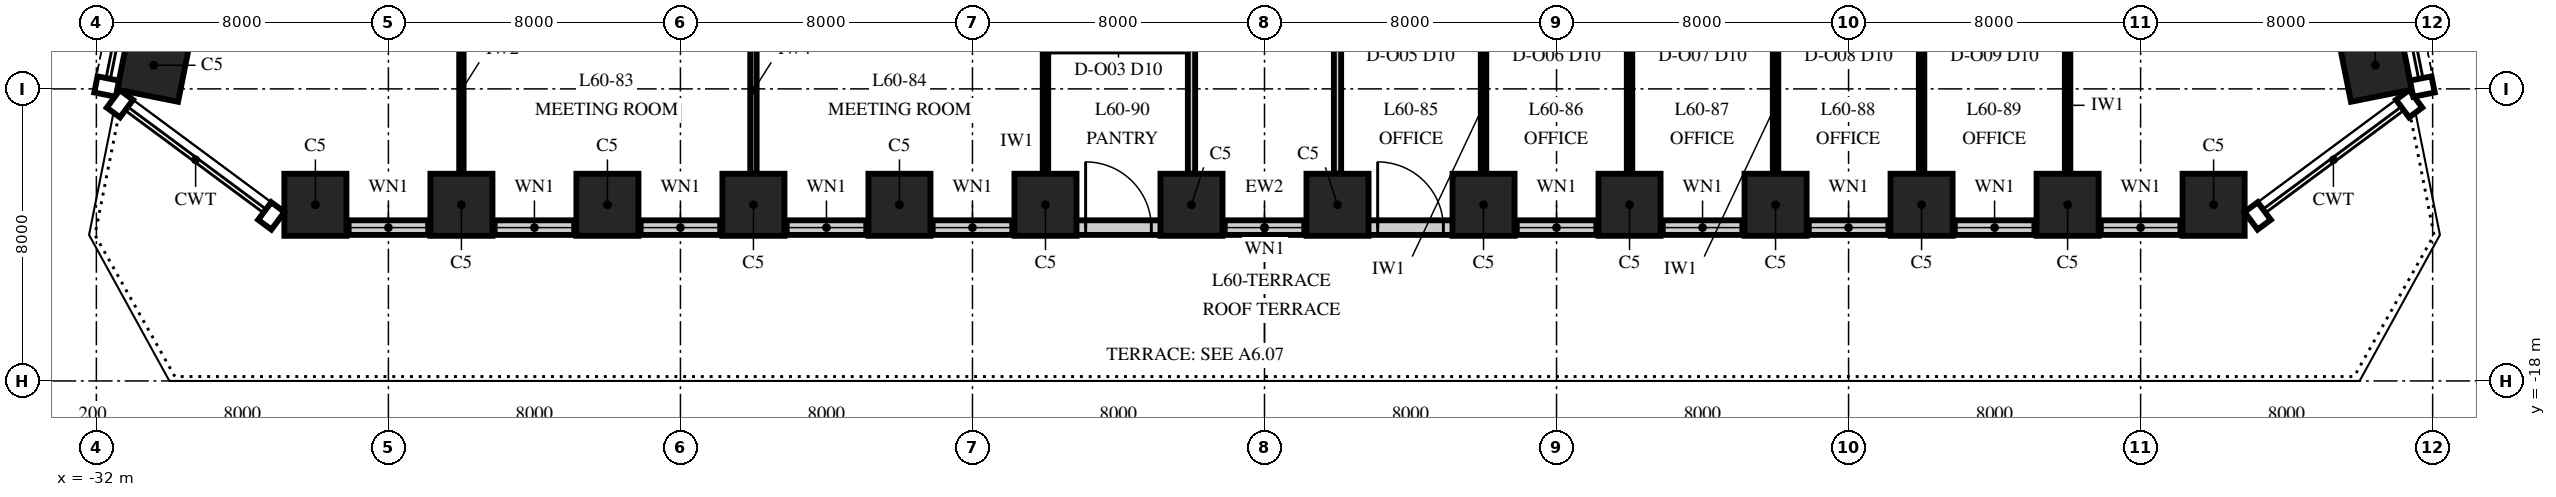
"""IFC4 building model, lengths in metres.
Left out: names, types, materials, properties, quantities, classifications, styles, units other than length and angle.
Written with IfcOpenShell. Run it as: python <this file> out.ifc"""

import sys

from ifc_helpers import new_model, si_unit, direction, frame, frame_2d, origin, origin_2d, place, context, subcontext, project, spatial, rectangle, extrude, element, fill, save


model = new_model("IFC4")
c1 = context("Model", 3, precision=1e-05, world=origin(), true_north=direction((0.0, 1.0)))
c2 = subcontext(c1, "Body", "Model", "MODEL_VIEW")
j1 = project(units=[si_unit("LENGTHUNIT", "METRE"), si_unit("PLANEANGLEUNIT", "RADIAN")], contexts=[c1])
p1 = place(None, origin())
s1 = spatial("IfcSite", under=j1, at=p1, CompositionType="ELEMENT")
p2 = place(p1, origin())
s2 = spatial("IfcBuilding", under=s1, at=p2, CompositionType="ELEMENT")
p3 = place(p2, frame((0.0, 0.0, 260.0)))
s3 = spatial("IfcBuildingStorey", under=s2, at=p3, CompositionType="ELEMENT", Elevation=260.0)
for number, where, z_axis, x_axis in (
    (1, (-26.0, -13.175, -0.25), (0.0, 0.0, 1.0), (1.0, 0.0, 0.0)),
    (2, (-22.0, -13.175, -0.25), (0.0, 0.0, 1.0), (1.0, 0.0, 0.0)),
    (3, (-18.0, -13.175, -0.25), (0.0, 0.0, 1.0), (1.0, 0.0, 0.0)),
    (4, (-14.0, -13.175, -0.25), (0.0, 0.0, 1.0), (1.0, 0.0, 0.0)),
    (5, (-10.0, -13.175, -0.25), (0.0, 0.0, 1.0), (1.0, 0.0, 0.0)),
    (6, (-6.0, -13.175, -0.25), (0.0, 0.0, 1.0), (1.0, 0.0, 0.0)),
    (7, (-2.0, -13.175, -0.25), (0.0, 0.0, 1.0), (1.0, 0.0, 0.0)),
    (8, (2.0, -13.175, -0.25), (0.0, 0.0, 1.0), (1.0, 0.0, 0.0)),
    (9, (6.0, -13.175, -0.25), (0.0, 0.0, 1.0), (1.0, 0.0, 0.0)),
    (10, (10.0, -13.175, -0.25), (0.0, 0.0, 1.0), (1.0, 0.0, 0.0)),
    (11, (14.0, -13.175, -0.25), (0.0, 0.0, 1.0), (1.0, 0.0, 0.0)),
    (12, (18.0, -13.175, -0.25), (0.0, 0.0, 1.0), (1.0, 0.0, 0.0)),
    (13, (22.0, -13.175, -0.25), (0.0, 0.0, 1.0), (1.0, 0.0, 0.0)),
    (14, (26.0, -13.175, -0.25), (0.0, 0.0, 1.0), (1.0, 0.0, 0.0)),
):
    element("IfcColumn", number, at=place(p3, frame(where, z_axis=z_axis, x_axis=x_axis)), inside=s3, PredefinedType="COLUMN", context=c2, shape_type="SweptSolid", body=[
        extrude(rectangle(XDim=1.7, YDim=1.7, at=origin_2d()), origin(), (0.0, 0.0, 1.0), 4.25),
    ])
for number, where, z_axis, x_axis in (
    (15, (30.429, -9.353, 0.0), (0.0, 0.0, 1.0), (-0.196, 0.981, 0.0)),
    (16, (-30.429, -9.353, 0.0), (0.0, 0.0, 1.0), (-0.196, -0.981, 0.0)),
):
    element("IfcColumn", number, at=place(p3, frame(where, z_axis=z_axis, x_axis=x_axis)), inside=s3, PredefinedType="COLUMN", context=c2, shape_type="SweptSolid", body=[
        extrude(rectangle(XDim=1.7, YDim=1.7, at=origin_2d()), origin(), (0.0, 0.0, 1.0), 4.0),
    ])
p4 = place(p3, frame((-26.0, -13.8, 0.0), z_axis=(0.0, 0.0, 1.0), x_axis=(1.0, 0.0, 0.0)))
e17 = element("IfcWall", 17, at=p4, inside=s3, PredefinedType="SOLIDWALL", context=c2, shape_type="SweptSolid", body=[
    extrude(rectangle(XDim=52.0, YDim=0.4, at=frame_2d((26.0, 0.0))), origin(), (0.0, 0.0, 1.0), 2.0),
])
p5 = place(p4, frame((0.95, 0.0, 0.8)))
e18 = element("IfcOpeningElement", 18, at=p5, cuts=e17, PredefinedType="OPENING", context=c2, shape_type="SweptSolid", body=[
    extrude(rectangle(XDim=2.1, YDim=1.15, at=frame_2d((1.05, 0.575))), frame((0.0, 0.215, 0.0), z_axis=(0.0, -1.0, 0.0), x_axis=(1.0, 0.0, 0.0)), (0.0, 0.0, 1.0), 0.43),
])
p6 = place(p4, frame((4.95, 0.0, 0.8)))
e19 = element("IfcOpeningElement", 19, at=p6, cuts=e17, PredefinedType="OPENING", context=c2, shape_type="SweptSolid", body=[
    extrude(rectangle(XDim=2.1, YDim=1.15, at=frame_2d((1.05, 0.575))), frame((0.0, 0.215, 0.0), z_axis=(0.0, -1.0, 0.0), x_axis=(1.0, 0.0, 0.0)), (0.0, 0.0, 1.0), 0.43),
])
p7 = place(p4, frame((8.95, 0.0, 0.8)))
e20 = element("IfcOpeningElement", 20, at=p7, cuts=e17, PredefinedType="OPENING", context=c2, shape_type="SweptSolid", body=[
    extrude(rectangle(XDim=2.1, YDim=1.15, at=frame_2d((1.05, 0.575))), frame((0.0, 0.215, 0.0), z_axis=(0.0, -1.0, 0.0), x_axis=(1.0, 0.0, 0.0)), (0.0, 0.0, 1.0), 0.43),
])
p8 = place(p4, frame((12.95, 0.0, 0.8)))
e21 = element("IfcOpeningElement", 21, at=p8, cuts=e17, PredefinedType="OPENING", context=c2, shape_type="SweptSolid", body=[
    extrude(rectangle(XDim=2.1, YDim=1.15, at=frame_2d((1.05, 0.575))), frame((0.0, 0.215, 0.0), z_axis=(0.0, -1.0, 0.0), x_axis=(1.0, 0.0, 0.0)), (0.0, 0.0, 1.0), 0.43),
])
p9 = place(p4, frame((16.95, 0.0, 0.8)))
e22 = element("IfcOpeningElement", 22, at=p9, cuts=e17, PredefinedType="OPENING", context=c2, shape_type="SweptSolid", body=[
    extrude(rectangle(XDim=2.1, YDim=1.15, at=frame_2d((1.05, 0.575))), frame((0.0, 0.215, 0.0), z_axis=(0.0, -1.0, 0.0), x_axis=(1.0, 0.0, 0.0)), (0.0, 0.0, 1.0), 0.43),
])
p10 = place(p4, frame((21.1, 0.0, 0.0)))
e23 = element("IfcOpeningElement", 23, at=p10, cuts=e17, PredefinedType="OPENING", context=c2, shape_type="SweptSolid", body=[
    extrude(rectangle(XDim=1.8, YDim=2.0, at=frame_2d((0.9, 1.0))), frame((0.0, 0.215, 0.0), z_axis=(0.0, -1.0, 0.0), x_axis=(1.0, 0.0, 0.0)), (0.0, 0.0, 1.0), 0.43),
])
p11 = place(p4, frame((24.95, 0.0, 0.8)))
e24 = element("IfcOpeningElement", 24, at=p11, cuts=e17, PredefinedType="OPENING", context=c2, shape_type="SweptSolid", body=[
    extrude(rectangle(XDim=2.1, YDim=1.15, at=frame_2d((1.05, 0.575))), frame((0.0, 0.215, 0.0), z_axis=(0.0, -1.0, 0.0), x_axis=(1.0, 0.0, 0.0)), (0.0, 0.0, 1.0), 0.43),
])
p12 = place(p4, frame((29.1, 0.0, 0.0)))
e25 = element("IfcOpeningElement", 25, at=p12, cuts=e17, PredefinedType="OPENING", context=c2, shape_type="SweptSolid", body=[
    extrude(rectangle(XDim=1.8, YDim=2.0, at=frame_2d((0.9, 1.0))), frame((0.0, 0.215, 0.0), z_axis=(0.0, -1.0, 0.0), x_axis=(1.0, 0.0, 0.0)), (0.0, 0.0, 1.0), 0.43),
])
p13 = place(p4, frame((32.95, 0.0, 0.8)))
e26 = element("IfcOpeningElement", 26, at=p13, cuts=e17, PredefinedType="OPENING", context=c2, shape_type="SweptSolid", body=[
    extrude(rectangle(XDim=2.1, YDim=1.15, at=frame_2d((1.05, 0.575))), frame((0.0, 0.215, 0.0), z_axis=(0.0, -1.0, 0.0), x_axis=(1.0, 0.0, 0.0)), (0.0, 0.0, 1.0), 0.43),
])
p14 = place(p4, frame((36.95, 0.0, 0.8)))
e27 = element("IfcOpeningElement", 27, at=p14, cuts=e17, PredefinedType="OPENING", context=c2, shape_type="SweptSolid", body=[
    extrude(rectangle(XDim=2.1, YDim=1.15, at=frame_2d((1.05, 0.575))), frame((0.0, 0.215, 0.0), z_axis=(0.0, -1.0, 0.0), x_axis=(1.0, 0.0, 0.0)), (0.0, 0.0, 1.0), 0.43),
])
p15 = place(p4, frame((40.95, 0.0, 0.8)))
e28 = element("IfcOpeningElement", 28, at=p15, cuts=e17, PredefinedType="OPENING", context=c2, shape_type="SweptSolid", body=[
    extrude(rectangle(XDim=2.1, YDim=1.15, at=frame_2d((1.05, 0.575))), frame((0.0, 0.215, 0.0), z_axis=(0.0, -1.0, 0.0), x_axis=(1.0, 0.0, 0.0)), (0.0, 0.0, 1.0), 0.43),
])
p16 = place(p4, frame((44.95, 0.0, 0.8)))
e29 = element("IfcOpeningElement", 29, at=p16, cuts=e17, PredefinedType="OPENING", context=c2, shape_type="SweptSolid", body=[
    extrude(rectangle(XDim=2.1, YDim=1.15, at=frame_2d((1.05, 0.575))), frame((0.0, 0.215, 0.0), z_axis=(0.0, -1.0, 0.0), x_axis=(1.0, 0.0, 0.0)), (0.0, 0.0, 1.0), 0.43),
])
p17 = place(p4, frame((48.95, 0.0, 0.8)))
e30 = element("IfcOpeningElement", 30, at=p17, cuts=e17, PredefinedType="OPENING", context=c2, shape_type="SweptSolid", body=[
    extrude(rectangle(XDim=2.1, YDim=1.15, at=frame_2d((1.05, 0.575))), frame((0.0, 0.215, 0.0), z_axis=(0.0, -1.0, 0.0), x_axis=(1.0, 0.0, 0.0)), (0.0, 0.0, 1.0), 0.43),
])
p18 = place(p3, frame((-22.0, -12.325, 0.0), z_axis=(0.0, 0.0, 1.0), x_axis=(0.0, 1.0, 0.0)))
e31 = element("IfcWall", 31, at=p18, inside=s3, PredefinedType="PARTITIONING", context=c2, shape_type="SweptSolid", body=[
    extrude(rectangle(XDim=4.565, YDim=0.12, at=frame_2d((2.282, 0.0))), origin(), (0.0, 0.0, 1.0), 3.23),
])
p19 = place(p3, frame((-14.0, -12.325, 0.0), z_axis=(0.0, 0.0, 1.0), x_axis=(0.0, 1.0, 0.0)))
e32 = element("IfcWall", 32, at=p19, inside=s3, PredefinedType="PARTITIONING", context=c2, shape_type="SweptSolid", body=[
    extrude(rectangle(XDim=4.565, YDim=0.175, at=frame_2d((2.282, 0.0))), origin(), (0.0, 0.0, 1.0), 3.23),
])
p20 = place(p3, frame((-6.0, -12.325, 0.0), z_axis=(0.0, 0.0, 1.0), x_axis=(0.0, 1.0, 0.0)))
e33 = element("IfcWall", 33, at=p20, inside=s3, PredefinedType="PARTITIONING", context=c2, shape_type="SweptSolid", body=[
    extrude(rectangle(XDim=3.35, YDim=0.15, at=frame_2d((1.675, 0.0))), origin(), (0.0, 0.0, 1.0), 3.23),
])
for number, where, z_axis, x_axis in (
    (34, (-2.0, -12.325, 0.0), (0.0, 0.0, 1.0), (0.0, 1.0, 0.0)),
    (35, (2.0, -12.325, 0.0), (0.0, 0.0, 1.0), (0.0, 1.0, 0.0)),
):
    element("IfcWall", number, at=place(p3, frame(where, z_axis=z_axis, x_axis=x_axis)), inside=s3, PredefinedType="PARTITIONING", context=c2, shape_type="SweptSolid", body=[
        extrude(rectangle(XDim=16.175, YDim=0.2, at=frame_2d((8.087, 0.0))), origin(), (0.0, 0.0, 1.0), 2.842),
    ])
for number, where, z_axis, x_axis in (
    (36, (6.0, -12.325, 0.0), (0.0, 0.0, 1.0), (0.0, 1.0, 0.0)),
    (37, (10.0, -12.325, 0.0), (0.0, 0.0, 1.0), (0.0, 1.0, 0.0)),
    (38, (14.0, -12.325, 0.0), (0.0, 0.0, 1.0), (0.0, 1.0, 0.0)),
    (39, (18.0, -12.325, 0.0), (0.0, 0.0, 1.0), (0.0, 1.0, 0.0)),
    (40, (22.0, -12.325, 0.0), (0.0, 0.0, 1.0), (0.0, 1.0, 0.0)),
):
    element("IfcWall", number, at=place(p3, frame(where, z_axis=z_axis, x_axis=x_axis)), inside=s3, PredefinedType="PARTITIONING", context=c2, shape_type="SweptSolid", body=[
        extrude(rectangle(XDim=3.75, YDim=0.15, at=frame_2d((1.875, 0.0))), origin(), (0.0, 0.0, 1.0), 3.23),
    ])
p21 = place(p5, origin())
e41 = element("IfcWindow", 41, at=p21, inside=s3, PartitioningType="SINGLE_PANEL", PredefinedType="WINDOW", context=c2, shape_type="SweptSolid", body=[
    extrude(rectangle(XDim=2.1, YDim=1.15, at=frame_2d((1.05, 0.575))), frame((0.0, 0.03, 0.0), z_axis=(0.0, -1.0, 0.0), x_axis=(1.0, 0.0, 0.0)), (0.0, 0.0, 1.0), 0.06),
])
fill(e18, e41)
p22 = place(p6, origin())
e42 = element("IfcWindow", 42, at=p22, inside=s3, PartitioningType="SINGLE_PANEL", PredefinedType="WINDOW", context=c2, shape_type="SweptSolid", body=[
    extrude(rectangle(XDim=2.1, YDim=1.15, at=frame_2d((1.05, 0.575))), frame((0.0, 0.03, 0.0), z_axis=(0.0, -1.0, 0.0), x_axis=(1.0, 0.0, 0.0)), (0.0, 0.0, 1.0), 0.06),
])
fill(e19, e42)
p23 = place(p7, origin())
e43 = element("IfcWindow", 43, at=p23, inside=s3, PartitioningType="SINGLE_PANEL", PredefinedType="WINDOW", context=c2, shape_type="SweptSolid", body=[
    extrude(rectangle(XDim=2.1, YDim=1.15, at=frame_2d((1.05, 0.575))), frame((0.0, 0.03, 0.0), z_axis=(0.0, -1.0, 0.0), x_axis=(1.0, 0.0, 0.0)), (0.0, 0.0, 1.0), 0.06),
])
fill(e20, e43)
p24 = place(p8, origin())
e44 = element("IfcWindow", 44, at=p24, inside=s3, PartitioningType="SINGLE_PANEL", PredefinedType="WINDOW", context=c2, shape_type="SweptSolid", body=[
    extrude(rectangle(XDim=2.1, YDim=1.15, at=frame_2d((1.05, 0.575))), frame((0.0, 0.03, 0.0), z_axis=(0.0, -1.0, 0.0), x_axis=(1.0, 0.0, 0.0)), (0.0, 0.0, 1.0), 0.06),
])
fill(e21, e44)
p25 = place(p9, origin())
e45 = element("IfcWindow", 45, at=p25, inside=s3, PartitioningType="SINGLE_PANEL", PredefinedType="WINDOW", context=c2, shape_type="SweptSolid", body=[
    extrude(rectangle(XDim=2.1, YDim=1.15, at=frame_2d((1.05, 0.575))), frame((0.0, 0.03, 0.0), z_axis=(0.0, -1.0, 0.0), x_axis=(1.0, 0.0, 0.0)), (0.0, 0.0, 1.0), 0.06),
])
fill(e22, e45)
p26 = place(p10, origin())
e46 = element("IfcDoor", 46, at=p26, inside=s3, OperationType="DOUBLE_DOOR_SINGLE_SWING", PredefinedType="DOOR", context=c2, shape_type="SweptSolid", body=[
    extrude(rectangle(XDim=1.8, YDim=2.0, at=frame_2d((0.9, 1.0))), frame((0.0, 0.2, 0.0), z_axis=(0.0, -1.0, 0.0), x_axis=(1.0, 0.0, 0.0)), (0.0, 0.0, 1.0), 0.399),
])
fill(e23, e46)
p27 = place(p11, origin())
e47 = element("IfcWindow", 47, at=p27, inside=s3, PartitioningType="SINGLE_PANEL", PredefinedType="WINDOW", context=c2, shape_type="SweptSolid", body=[
    extrude(rectangle(XDim=2.1, YDim=1.15, at=frame_2d((1.05, 0.575))), frame((0.0, 0.03, 0.0), z_axis=(0.0, -1.0, 0.0), x_axis=(1.0, 0.0, 0.0)), (0.0, 0.0, 1.0), 0.06),
])
fill(e24, e47)
p28 = place(p12, origin())
e48 = element("IfcDoor", 48, at=p28, inside=s3, OperationType="DOUBLE_DOOR_SINGLE_SWING", PredefinedType="DOOR", context=c2, shape_type="SweptSolid", body=[
    extrude(rectangle(XDim=1.8, YDim=2.0, at=frame_2d((0.9, 1.0))), frame((0.0, 0.2, 0.0), z_axis=(0.0, -1.0, 0.0), x_axis=(1.0, 0.0, 0.0)), (0.0, 0.0, 1.0), 0.399),
])
fill(e25, e48)
p29 = place(p13, origin())
e49 = element("IfcWindow", 49, at=p29, inside=s3, PartitioningType="SINGLE_PANEL", PredefinedType="WINDOW", context=c2, shape_type="SweptSolid", body=[
    extrude(rectangle(XDim=2.1, YDim=1.15, at=frame_2d((1.05, 0.575))), frame((0.0, 0.03, 0.0), z_axis=(0.0, -1.0, 0.0), x_axis=(1.0, 0.0, 0.0)), (0.0, 0.0, 1.0), 0.06),
])
fill(e26, e49)
p30 = place(p14, origin())
e50 = element("IfcWindow", 50, at=p30, inside=s3, PartitioningType="SINGLE_PANEL", PredefinedType="WINDOW", context=c2, shape_type="SweptSolid", body=[
    extrude(rectangle(XDim=2.1, YDim=1.15, at=frame_2d((1.05, 0.575))), frame((0.0, 0.03, 0.0), z_axis=(0.0, -1.0, 0.0), x_axis=(1.0, 0.0, 0.0)), (0.0, 0.0, 1.0), 0.06),
])
fill(e27, e50)
p31 = place(p15, origin())
e51 = element("IfcWindow", 51, at=p31, inside=s3, PartitioningType="SINGLE_PANEL", PredefinedType="WINDOW", context=c2, shape_type="SweptSolid", body=[
    extrude(rectangle(XDim=2.1, YDim=1.15, at=frame_2d((1.05, 0.575))), frame((0.0, 0.03, 0.0), z_axis=(0.0, -1.0, 0.0), x_axis=(1.0, 0.0, 0.0)), (0.0, 0.0, 1.0), 0.06),
])
fill(e28, e51)
p32 = place(p16, origin())
e52 = element("IfcWindow", 52, at=p32, inside=s3, PartitioningType="SINGLE_PANEL", PredefinedType="WINDOW", context=c2, shape_type="SweptSolid", body=[
    extrude(rectangle(XDim=2.1, YDim=1.15, at=frame_2d((1.05, 0.575))), frame((0.0, 0.03, 0.0), z_axis=(0.0, -1.0, 0.0), x_axis=(1.0, 0.0, 0.0)), (0.0, 0.0, 1.0), 0.06),
])
fill(e29, e52)
p33 = place(p17, origin())
e53 = element("IfcWindow", 53, at=p33, inside=s3, PartitioningType="SINGLE_PANEL", PredefinedType="WINDOW", context=c2, shape_type="SweptSolid", body=[
    extrude(rectangle(XDim=2.1, YDim=1.15, at=frame_2d((1.05, 0.575))), frame((0.0, 0.03, 0.0), z_axis=(0.0, -1.0, 0.0), x_axis=(1.0, 0.0, 0.0)), (0.0, 0.0, 1.0), 0.06),
])
fill(e30, e53)
save(model, sys.argv[1])
